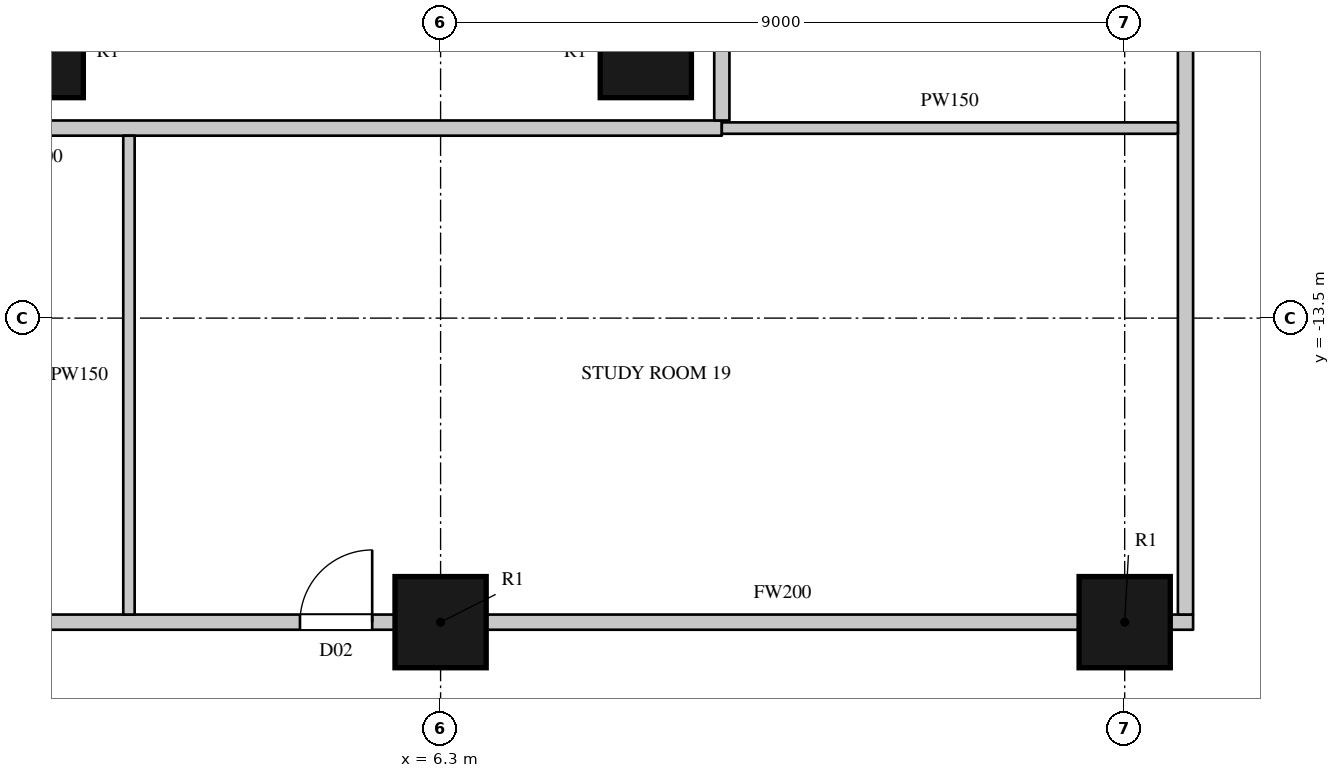
"""IFC4 building model, lengths in metres.
Left out: names, types, materials, properties, quantities, classifications, styles, units other than length and angle.
Written with IfcOpenShell. Run it as: python <this file> out.ifc"""

import sys

from ifc_helpers import new_model, si_unit, direction, frame, frame_2d, origin, origin_2d, place, context, subcontext, project, spatial, rectangle, circle, extrude, element, fill, save


model = new_model("IFC4")
c1 = context("Model", 3, precision=1e-05, world=origin(), true_north=direction((0.0, 1.0)))
c2 = subcontext(c1, "Body", "Model", "MODEL_VIEW")
j1 = project(units=[si_unit("LENGTHUNIT", "METRE"), si_unit("PLANEANGLEUNIT", "RADIAN")], contexts=[c1])
p1 = place(None, origin())
s1 = spatial("IfcSite", under=j1, at=p1, CompositionType="ELEMENT")
p2 = place(p1, origin())
s2 = spatial("IfcBuilding", under=s1, at=p2, CompositionType="ELEMENT")
p3 = place(p2, frame((0.0, 0.0, 98.7)))
s3 = spatial("IfcBuildingStorey", under=s2, at=p3, CompositionType="ELEMENT", Elevation=98.7)
for number, where, z_axis, x_axis in (
    (1, (6.3, -17.5, 0.0), (0.0, 0.0, 1.0), (1.0, 0.0, 0.0)),
    (2, (15.3, -17.5, 0.0), (0.0, 0.0, 1.0), (1.0, 0.0, 0.0)),
    (3, (1.0, -10.0, 0.0), (0.0, 0.0, 1.0), (1.0, 0.0, 0.0)),
    (4, (9.0, -10.0, 0.0), (0.0, 0.0, 1.0), (1.0, 0.0, 0.0)),
):
    element("IfcColumn", number, at=place(p3, frame(where, z_axis=z_axis, x_axis=x_axis)), inside=s3, PredefinedType="COLUMN", context=c2, shape_type="SweptSolid", body=[
        extrude(circle(Radius=0.6, at=origin_2d()), origin(), (0.0, 0.0, 1.0), 3.6),
    ])
p4 = place(p3, frame((-8.1, -11.0, 0.0), z_axis=(0.0, 0.0, 1.0), x_axis=(1.0, 0.0, 0.0)))
e5 = element("IfcWall", 5, at=p4, inside=s3, PredefinedType="PARTITIONING", context=c2, shape_type="SweptSolid", body=[
    extrude(rectangle(XDim=18.1, YDim=0.2, at=frame_2d((9.05, 0.0))), origin(), (0.0, 0.0, 1.0), 3.3),
])
p5 = place(p4, frame((1.7, 0.0, 0.0)))
e6 = element("IfcOpeningElement", 6, at=p5, cuts=e5, PredefinedType="OPENING", context=c2, shape_type="SweptSolid", body=[
    extrude(rectangle(XDim=1.5, YDim=2.2, at=frame_2d((0.75, 1.1))), frame((0.0, 0.11, 0.0), z_axis=(0.0, -1.0, 0.0), x_axis=(1.0, 0.0, 0.0)), (0.0, 0.0, 1.0), 0.22),
])
p6 = place(p3, frame((-2.1, -17.5, 0.0), z_axis=(0.0, 0.0, 1.0), x_axis=(1.0, 0.0, 0.0)))
e7 = element("IfcWall", 7, at=p6, inside=s3, PredefinedType="PARTITIONING", context=c2, shape_type="SweptSolid", body=[
    extrude(rectangle(XDim=7.8, YDim=0.2, at=frame_2d((3.9, 0.0))), origin(), (0.0, 0.0, 1.0), 2.75),
])
p7 = place(p6, frame((6.55, 0.0, 0.0)))
e8 = element("IfcOpeningElement", 8, at=p7, cuts=e7, PredefinedType="OPENING", context=c2, shape_type="SweptSolid", body=[
    extrude(rectangle(XDim=0.95, YDim=2.2, at=frame_2d((0.475, 1.1))), frame((0.0, 0.11, 0.0), z_axis=(0.0, -1.0, 0.0), x_axis=(1.0, 0.0, 0.0)), (0.0, 0.0, 1.0), 0.22),
])
p8 = place(p3, frame((6.9, -17.5, 0.0), z_axis=(0.0, 0.0, 1.0), x_axis=(1.0, 0.0, 0.0)))
e9 = element("IfcWall", 9, at=p8, inside=s3, PredefinedType="PARTITIONING", context=c2, shape_type="SweptSolid", body=[
    extrude(rectangle(XDim=7.8, YDim=0.2, at=frame_2d((3.9, 0.0))), origin(), (0.0, 0.0, 1.0), 2.75),
])
p9 = place(p3, frame((15.9, -17.5, 0.0), z_axis=(0.0, 0.0, 1.0), x_axis=(1.0, 0.0, 0.0)))
e10 = element("IfcWall", 10, at=p9, inside=s3, PredefinedType="PARTITIONING", context=c2, shape_type="SweptSolid", body=[
    extrude(rectangle(XDim=0.3, YDim=0.2, at=frame_2d((0.15, 0.0))), origin(), (0.0, 0.0, 1.0), 3.3),
])
p10 = place(p3, frame((10.0, -10.9, 0.0), z_axis=(0.0, 0.0, 1.0), x_axis=(0.0, 1.0, 0.0)))
e11 = element("IfcWall", 11, at=p10, inside=s3, PredefinedType="PARTITIONING", context=c2, shape_type="SweptSolid", body=[
    extrude(rectangle(XDim=21.8, YDim=0.2, at=frame_2d((10.9, 0.0))), origin(), (0.0, 0.0, 1.0), 3.3),
])
p11 = place(p10, frame((15.9, 0.0, 0.0)))
e12 = element("IfcOpeningElement", 12, at=p11, cuts=e11, PredefinedType="OPENING", context=c2, shape_type="SweptSolid", body=[
    extrude(rectangle(XDim=1.5, YDim=2.2, at=frame_2d((0.75, 1.1))), frame((0.0, 0.11, 0.0), z_axis=(0.0, -1.0, 0.0), x_axis=(1.0, 0.0, 0.0)), (0.0, 0.0, 1.0), 0.22),
])
p12 = place(p10, frame((11.55, 0.0, 0.0)))
e13 = element("IfcOpeningElement", 13, at=p12, cuts=e11, PredefinedType="OPENING", context=c2, shape_type="SweptSolid", body=[
    extrude(rectangle(XDim=1.5, YDim=2.2, at=frame_2d((0.75, 1.1))), frame((0.0, 0.11, 0.0), z_axis=(0.0, -1.0, 0.0), x_axis=(1.0, 0.0, 0.0)), (0.0, 0.0, 1.0), 0.22),
])
p13 = place(p3, frame((16.1, -17.4, 0.0), z_axis=(0.0, 0.0, 1.0), x_axis=(0.0, 1.0, 0.0)))
e14 = element("IfcWall", 14, at=p13, inside=s3, PredefinedType="PARTITIONING", context=c2, shape_type="SweptSolid", body=[
    extrude(rectangle(XDim=10.575, YDim=0.2, at=frame_2d((5.288, 0.0))), origin(), (0.0, 0.0, 1.0), 3.3),
])
p14 = place(p3, frame((2.2, -17.4, 0.0), z_axis=(0.0, 0.0, 1.0), x_axis=(0.0, 1.0, 0.0)))
e15 = element("IfcWall", 15, at=p14, inside=s3, PredefinedType="PARTITIONING", context=c2, shape_type="SweptSolid", body=[
    extrude(rectangle(XDim=6.3, YDim=0.15, at=frame_2d((3.15, 0.0))), origin(), (0.0, 0.0, 1.0), 3.3),
])
p15 = place(p3, frame((10.0, -11.0, 0.0), z_axis=(0.0, 0.0, 1.0), x_axis=(1.0, 0.0, 0.0)))
e16 = element("IfcWall", 16, at=p15, inside=s3, PredefinedType="PARTITIONING", context=c2, shape_type="SweptSolid", body=[
    extrude(rectangle(XDim=6.0, YDim=0.15, at=frame_2d((3.0, 0.0))), origin(), (0.0, 0.0, 1.0), 3.3),
])
p16 = place(p7, origin())
e17 = element("IfcDoor", 17, at=p16, inside=s3, OperationType="SINGLE_SWING_RIGHT", PredefinedType="DOOR", context=c2, shape_type="SweptSolid", body=[
    extrude(rectangle(XDim=0.95, YDim=2.2, at=frame_2d((0.475, 1.1))), frame((0.0, 0.025, 0.0), z_axis=(0.0, -1.0, 0.0), x_axis=(1.0, 0.0, 0.0)), (0.0, 0.0, 1.0), 0.05),
])
fill(e8, e17)
save(model, sys.argv[1])
